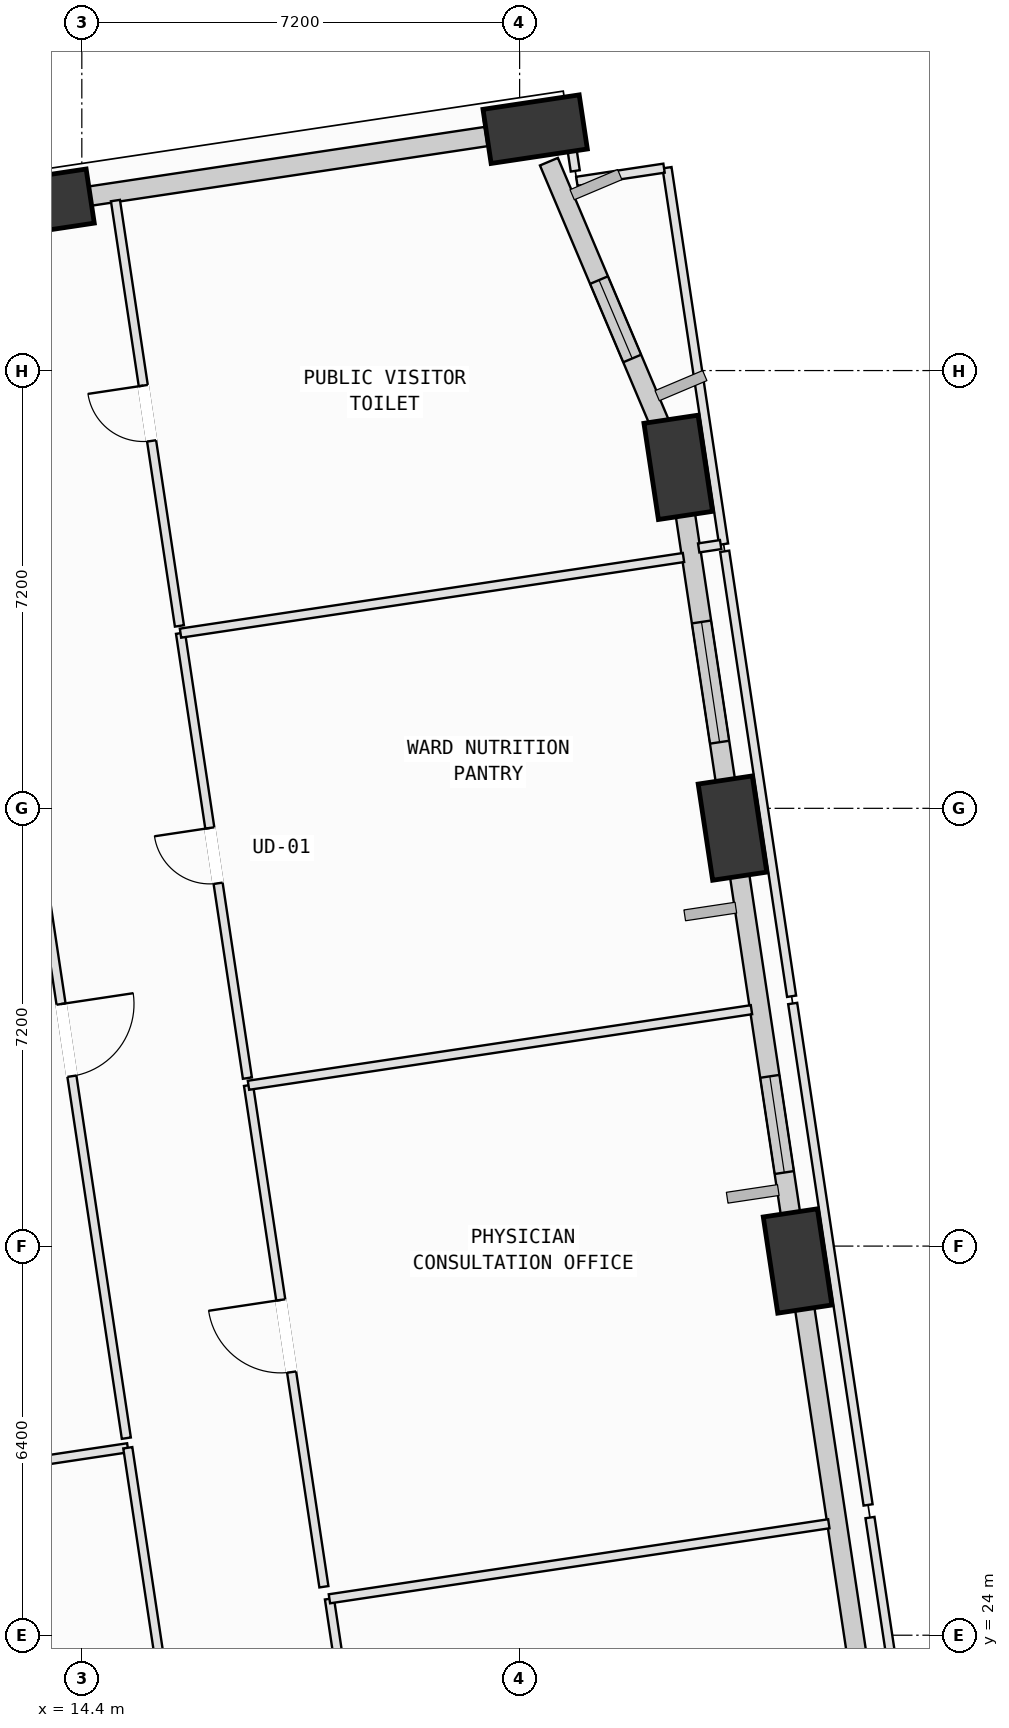
"""IFC4 building model, lengths in metres.
Left out: names, types, materials, properties, quantities, classifications, styles, units other than length and angle.
Written with IfcOpenShell. Run it as: python <this file> out.ifc"""

import sys

from ifc_helpers import new_model, si_unit, direction, frame, frame_2d, origin, origin_2d, place, context, subcontext, project, spatial, rectangle, extrude, element, fill, save


model = new_model("IFC4")
c1 = context("Model", 3, precision=1e-05, world=origin(), true_north=direction((0.0, 1.0)))
c2 = subcontext(c1, "Body", "Model", "MODEL_VIEW")
j1 = project(units=[si_unit("LENGTHUNIT", "METRE"), si_unit("PLANEANGLEUNIT", "RADIAN")], contexts=[c1])
p1 = place(None, origin())
s1 = spatial("IfcSite", under=j1, at=p1, CompositionType="ELEMENT")
p2 = place(p1, origin())
s2 = spatial("IfcBuilding", under=s1, at=p2, CompositionType="ELEMENT")
p3 = place(p2, frame((0.0, 0.0, 59.0)))
s3 = spatial("IfcBuildingStorey", under=s2, at=p3, CompositionType="ELEMENT", Elevation=59.0)
p4 = place(p3, frame((26.171, 30.155, 0.002), z_axis=(-0.021914585822, -0.030949011175, 0.999280696119), x_axis=(0.449715530526, 0.892384243507, 0.037500713923)))
e1 = element("IfcColumn", 1, at=p4, inside=s3, PredefinedType="COLUMN", context=c2, shape_type="SweptSolid", body=[
    extrude(rectangle(XDim=1.6, YDim=0.9, at=origin_2d()), origin(), (0.0, 0.0, 1.0), 4.0),
])
p5 = place(p3, frame((25.101, 37.275, 0.002), z_axis=(-0.051335188808, -0.035544435956, 0.998048742027), x_axis=(0.726800201877, 0.684067930172, 0.061745716144)))
e2 = element("IfcColumn", 2, at=p5, inside=s3, PredefinedType="COLUMN", context=c2, shape_type="SweptSolid", body=[
    extrude(rectangle(XDim=1.6, YDim=0.9, at=origin_2d()), origin(), (0.0, 0.0, 1.0), 4.004),
])
p6 = place(p3, frame((24.209, 43.208, 0.002), z_axis=(-0.075715415354, -0.039379319722, 0.996351566996), x_axis=(0.805520773142, 0.586526828965, 0.084395277955)))
e3 = element("IfcColumn", 3, at=p6, inside=s3, PredefinedType="COLUMN", context=c2, shape_type="SweptSolid", body=[
    extrude(rectangle(XDim=1.6, YDim=0.9, at=origin_2d()), origin(), (0.0, 0.0, 1.0), 4.011),
])
p7 = place(p3, frame((21.855, 48.77, 0.002), z_axis=(-0.098301160351, -0.04918093878, 0.993940701015), x_axis=(0.574616565442, -0.818259586508, 0.016341719877)))
e4 = element("IfcColumn", 4, at=p7, inside=s3, PredefinedType="COLUMN", context=c2, shape_type="SweptSolid", body=[
    extrude(rectangle(XDim=1.6, YDim=0.9, at=origin_2d()), origin(), (0.0, 0.0, 1.0), 4.021),
])
p8 = place(p3, frame((13.747, 47.551, 0.002), z_axis=(-0.092921619704, -0.082435357337, 0.992254999711), x_axis=(0.766615105201, -0.64184127574, 0.018467734958)))
e5 = element("IfcColumn", 5, at=p8, inside=s3, PredefinedType="COLUMN", context=c2, shape_type="SweptSolid", body=[
    extrude(rectangle(XDim=1.6, YDim=0.9, at=origin_2d()), origin(), (0.0, 0.0, 1.0), 4.028),
])
p9 = place(p3, frame((27.241, 23.039, 0.0), z_axis=(0.0, 0.0, 1.0), x_axis=(-0.148660081435, 0.988888355775, 0.0)))
e6 = element("IfcWall", 6, at=p9, inside=s3, PredefinedType="SOLIDWALL", context=c2, shape_type="SweptSolid", body=[
    extrude(rectangle(XDim=6.536, YDim=0.32, at=frame_2d((3.268, 0.0))), origin(), (0.0, 0.0, 1.0), 3.165),
])
p10 = place(p3, frame((26.089, 30.7, 0.0), z_axis=(0.0, 0.0, 1.0), x_axis=(-0.148645050691, 0.988890615238, 0.0)))
e7 = element("IfcWall", 7, at=p10, inside=s3, PredefinedType="SOLIDWALL", context=c2, shape_type="SweptSolid", body=[
    extrude(rectangle(XDim=5.997, YDim=0.32, at=frame_2d((2.998, 0.0))), origin(), (0.0, 0.0, 1.0), 3.165),
])
p11 = place(p10, frame((0.92, 0.0, 0.75)))
e8 = element("IfcOpeningElement", 8, at=p11, cuts=e7, PredefinedType="OPENING", context=c2, shape_type="SweptSolid", body=[
    extrude(rectangle(XDim=1.6, YDim=1.95, at=frame_2d((0.8, 0.975))), frame((0.0, 0.17, 0.0), z_axis=(0.0, -1.0, 0.0), x_axis=(1.0, 0.0, 0.0)), (0.0, 0.0, 1.0), 0.34),
])
p12 = place(p3, frame((25.02, 37.811, 0.0), z_axis=(0.0, 0.0, 1.0), x_axis=(-0.148677559995, 0.988885728056, 0.0)))
e9 = element("IfcWall", 9, at=p12, inside=s3, PredefinedType="SOLIDWALL", context=c2, shape_type="SweptSolid", body=[
    extrude(rectangle(XDim=4.816, YDim=0.32, at=frame_2d((2.408, 0.0))), origin(), (0.0, 0.0, 1.0), 3.165),
])
p13 = place(p12, frame((0.886, 0.0, 0.75)))
e10 = element("IfcOpeningElement", 10, at=p13, cuts=e9, PredefinedType="OPENING", context=c2, shape_type="SweptSolid", body=[
    extrude(rectangle(XDim=2.0, YDim=1.95, at=frame_2d((1.0, 0.975))), frame((0.0, 0.17, 0.0), z_axis=(0.0, -1.0, 0.0), x_axis=(1.0, 0.0, 0.0)), (0.0, 0.0, 1.0), 0.34),
])
p14 = place(p3, frame((22.082, 48.236, 0.0), z_axis=(0.0, 0.0, 1.0), x_axis=(0.389648135914, -0.920963805032, 0.0)))
e11 = element("IfcWall", 11, at=p14, inside=s3, PredefinedType="SOLIDWALL", context=c2, shape_type="SweptSolid", body=[
    extrude(rectangle(XDim=4.889, YDim=0.32, at=frame_2d((2.445, 0.0))), origin(), (0.0, 0.0, 1.0), 3.165),
])
p15 = place(p14, frame((2.115, 0.0, 0.75)))
e12 = element("IfcOpeningElement", 12, at=p15, cuts=e11, PredefinedType="OPENING", context=c2, shape_type="SweptSolid", body=[
    extrude(rectangle(XDim=1.4, YDim=1.85, at=frame_2d((0.7, 0.925))), frame((0.0, 0.17, 0.0), z_axis=(0.0, -1.0, 0.0), x_axis=(1.0, 0.0, 0.0)), (0.0, 0.0, 1.0), 0.34),
])
p16 = place(p3, frame((14.125, 47.608, 0.0), z_axis=(0.0, 0.0, 1.0), x_axis=(0.988884639761, 0.1486847983, 0.0)))
e13 = element("IfcWall", 13, at=p16, inside=s3, PredefinedType="SOLIDWALL", context=c2, shape_type="SweptSolid", body=[
    extrude(rectangle(XDim=7.003, YDim=0.32, at=frame_2d((3.501, 0.0))), origin(), (0.0, 0.0, 1.0), 3.165),
])
p17 = place(p3, frame((5.845, 25.683, 0.0), z_axis=(0.0, 0.0, 1.0), x_axis=(0.988885704997, 0.148677713369, 0.0)))
e14 = element("IfcWall", 14, at=p17, inside=s3, PredefinedType="PARTITIONING", context=c2, shape_type="SweptSolid", body=[
    extrude(rectangle(XDim=9.416, YDim=0.15, at=frame_2d((4.708, 0.0))), origin(), (0.0, 0.0, 1.0), 3.78),
])
p18 = place(p3, frame((15.156, 27.083, 0.0), z_axis=(0.0, 0.0, 1.0), x_axis=(0.148580091248, -0.988900377432, 0.0)))
e15 = element("IfcWall", 15, at=p18, inside=s3, PredefinedType="PARTITIONING", context=c2, shape_type="SweptSolid", body=[
    extrude(rectangle(XDim=6.576, YDim=0.15, at=frame_2d((3.288, 0.0))), origin(), (0.0, 0.0, 1.0), 3.78),
])
p19 = place(p3, frame((13.163, 40.334, 0.0), z_axis=(0.0, 0.0, 1.0), x_axis=(0.148712834823, -0.988880423893, 0.0)))
e16 = element("IfcWall", 16, at=p19, inside=s3, PredefinedType="PARTITIONING", context=c2, shape_type="SweptSolid", body=[
    extrude(rectangle(XDim=13.24, YDim=0.15, at=frame_2d((6.62, 0.0))), origin(), (0.0, 0.0, 1.0), 2.865),
])
p20 = place(p19, frame((6.02, 0.0, 0.0)))
e17 = element("IfcOpeningElement", 17, at=p20, cuts=e16, PredefinedType="OPENING", context=c2, shape_type="SweptSolid", body=[
    extrude(rectangle(XDim=1.2, YDim=2.15, at=frame_2d((0.6, 1.075))), frame((0.0, 0.085, 0.0), z_axis=(0.0, -1.0, 0.0), x_axis=(1.0, 0.0, 0.0)), (0.0, 0.0, 1.0), 0.17),
])
p21 = place(p3, frame((19.076, 20.58, 0.0), z_axis=(0.0, 0.0, 1.0), x_axis=(-0.148616569828, 0.988894895918, 0.0)))
e18 = element("IfcWall", 18, at=p21, inside=s3, PredefinedType="PARTITIONING", context=c2, shape_type="SweptSolid", body=[
    extrude(rectangle(XDim=4.064, YDim=0.15, at=frame_2d((2.032, 0.0))), origin(), (0.0, 0.0, 1.0), 3.78),
])
p22 = place(p3, frame((18.472, 24.599, 0.0), z_axis=(0.0, 0.0, 1.0), x_axis=(0.988902475287, 0.148566127942, 0.0)))
e19 = element("IfcWall", 19, at=p22, inside=s3, PredefinedType="PARTITIONING", context=c2, shape_type="SweptSolid", body=[
    extrude(rectangle(XDim=8.305, YDim=0.15, at=frame_2d((4.153, 0.0))), origin(), (0.0, 0.0, 1.0), 3.78),
])
p23 = place(p3, frame((27.362, 25.935, 0.0), z_axis=(0.0, 0.0, 1.0), x_axis=(0.148721659191, -0.9888790968, 0.0)))
e20 = element("IfcWall", 20, at=p23, inside=s3, PredefinedType="PARTITIONING", context=c2, shape_type="SweptSolid", body=[
    extrude(rectangle(XDim=2.85, YDim=0.15, at=frame_2d((1.425, 0.0))), origin(), (0.0, 0.0, 1.0), 3.78),
])
p24 = place(p3, frame((27.786, 23.117, 0.0), z_axis=(0.0, 0.0, 1.0), x_axis=(0.988887440996, 0.148666166425, 0.0)))
e21 = element("IfcWall", 21, at=p24, inside=s3, PredefinedType="PARTITIONING", context=c2, shape_type="SweptSolid", body=[
    extrude(rectangle(XDim=14.368, YDim=0.15, at=frame_2d((7.184, 0.0))), origin(), (0.0, 0.0, 1.0), 3.165),
])
p25 = place(p3, frame((18.381, 24.797, 0.0), z_axis=(0.0, 0.0, 1.0), x_axis=(-0.148671093469, 0.988886700268, 0.0)))
e22 = element("IfcWall", 22, at=p25, inside=s3, PredefinedType="PARTITIONING", context=c2, shape_type="SweptSolid", body=[
    extrude(rectangle(XDim=8.341, YDim=0.15, at=frame_2d((4.17, 0.0))), origin(), (0.0, 0.0, 1.0), 3.78),
])
p26 = place(p25, frame((3.57, 0.0, 0.0)))
e23 = element("IfcOpeningElement", 23, at=p26, cuts=e22, PredefinedType="OPENING", context=c2, shape_type="SweptSolid", body=[
    extrude(rectangle(XDim=1.2, YDim=2.15, at=frame_2d((0.6, 1.075))), frame((0.0, 0.085, 0.0), z_axis=(0.0, -1.0, 0.0), x_axis=(1.0, 0.0, 0.0)), (0.0, 0.0, 1.0), 0.17),
])
p27 = place(p3, frame((17.141, 33.045, 0.0), z_axis=(0.0, 0.0, 1.0), x_axis=(0.988894782311, 0.148617325764, 0.0)))
e24 = element("IfcWall", 24, at=p27, inside=s3, PredefinedType="PARTITIONING", context=c2, shape_type="SweptSolid", body=[
    extrude(rectangle(XDim=8.365, YDim=0.15, at=frame_2d((4.182, 0.0))), origin(), (0.0, 0.0, 1.0), 3.78),
])
p28 = place(p3, frame((26.091, 34.39, 0.0), z_axis=(0.0, 0.0, 1.0), x_axis=(0.148688309423, -0.988884111836, 0.0)))
e25 = element("IfcWall", 25, at=p28, inside=s3, PredefinedType="PARTITIONING", context=c2, shape_type="SweptSolid", body=[
    extrude(rectangle(XDim=8.34, YDim=0.15, at=frame_2d((4.17, 0.0))), origin(), (0.0, 0.0, 1.0), 3.78),
])
p29 = place(p3, frame((17.123, 33.163, 0.0), z_axis=(0.0, 0.0, 1.0), x_axis=(-0.148659874273, 0.988888386918, 0.0)))
e26 = element("IfcWall", 26, at=p29, inside=s3, PredefinedType="PARTITIONING", context=c2, shape_type="SweptSolid", body=[
    extrude(rectangle(XDim=7.4, YDim=0.15, at=frame_2d((3.7, 0.0))), origin(), (0.0, 0.0, 1.0), 3.78),
])
p30 = place(p29, frame((3.24, 0.0, 0.0)))
e27 = element("IfcOpeningElement", 27, at=p30, cuts=e26, PredefinedType="OPENING", context=c2, shape_type="SweptSolid", body=[
    extrude(rectangle(XDim=0.92, YDim=2.1, at=frame_2d((0.46, 1.05))), frame((0.0, 0.085, 0.0), z_axis=(0.0, -1.0, 0.0), x_axis=(1.0, 0.0, 0.0)), (0.0, 0.0, 1.0), 0.17),
])
p31 = place(p3, frame((16.023, 40.481, 0.0), z_axis=(0.0, 0.0, 1.0), x_axis=(0.98887761826, 0.148731489955, 0.0)))
e28 = element("IfcWall", 28, at=p31, inside=s3, PredefinedType="PARTITIONING", context=c2, shape_type="SweptSolid", body=[
    extrude(rectangle(XDim=8.365, YDim=0.15, at=frame_2d((4.183, 0.0))), origin(), (0.0, 0.0, 1.0), 3.78),
])
p32 = place(p3, frame((24.973, 41.827, 0.0), z_axis=(0.0, 0.0, 1.0), x_axis=(0.148659874273, -0.988888386918, 0.0)))
e29 = element("IfcWall", 29, at=p32, inside=s3, PredefinedType="PARTITIONING", context=c2, shape_type="SweptSolid", body=[
    extrude(rectangle(XDim=7.4, YDim=0.15, at=frame_2d((3.7, 0.0))), origin(), (0.0, 0.0, 1.0), 3.78),
])
p33 = place(p3, frame((24.024, 48.136, 0.0), z_axis=(0.0, 0.0, 1.0), x_axis=(0.148733268236, -0.988877350797, 0.0)))
e30 = element("IfcWall", 30, at=p33, inside=s3, PredefinedType="PARTITIONING", context=c2, shape_type="SweptSolid", body=[
    extrude(rectangle(XDim=6.26, YDim=0.15, at=frame_2d((3.13, 0.0))), origin(), (0.0, 0.0, 1.0), 3.78),
])
p34 = place(p3, frame((24.906, 41.938, 0.0), z_axis=(0.0, 0.0, 1.0), x_axis=(-0.988625320152, -0.150399389475, 0.0)))
e31 = element("IfcWall", 31, at=p34, inside=s3, PredefinedType="PARTITIONING", context=c2, shape_type="SweptSolid", body=[
    extrude(rectangle(XDim=0.365, YDim=0.15, at=frame_2d((0.183, 0.0))), origin(), (0.0, 0.0, 1.0), 3.78),
])
p35 = place(p3, frame((16.005, 40.6, 0.0), z_axis=(0.0, 0.0, 1.0), x_axis=(-0.148703261216, 0.988881863573, 0.0)))
e32 = element("IfcWall", 32, at=p35, inside=s3, PredefinedType="PARTITIONING", context=c2, shape_type="SweptSolid", body=[
    extrude(rectangle(XDim=7.074, YDim=0.15, at=frame_2d((3.537, 0.0))), origin(), (0.0, 0.0, 1.0), 3.78),
])
p36 = place(p35, frame((3.077, 0.0, 0.0)))
e33 = element("IfcOpeningElement", 33, at=p36, cuts=e32, PredefinedType="OPENING", context=c2, shape_type="SweptSolid", body=[
    extrude(rectangle(XDim=0.92, YDim=2.1, at=frame_2d((0.46, 1.05))), frame((0.0, 0.085, 0.0), z_axis=(0.0, -1.0, 0.0), x_axis=(1.0, 0.0, 0.0)), (0.0, 0.0, 1.0), 0.17),
])
p37 = place(p3, frame((21.022, 48.837, 0.0), z_axis=(0.0, 0.0, 1.0), x_axis=(0.988854825253, 0.148882955956, 0.0)))
e34 = element("IfcWall", 34, at=p37, inside=s3, PredefinedType="PARTITIONING", context=c2, shape_type="SweptSolid", body=[
    extrude(rectangle(XDim=1.364, YDim=0.15, at=frame_2d((0.682, 0.0))), origin(), (0.0, 0.0, 1.0), 3.165),
])
p38 = place(p3, frame((22.378, 48.991, 0.0), z_axis=(0.0, 0.0, 1.0), x_axis=(0.149316522571, -0.988789449826, 0.0)))
e35 = element("IfcWall", 35, at=p38, inside=s3, PredefinedType="PARTITIONING", context=c2, shape_type="SweptSolid", body=[
    extrude(rectangle(XDim=0.917, YDim=0.15, at=frame_2d((0.458, 0.0))), origin(), (0.0, 0.0, 1.0), 3.78),
])
p39 = place(p3, frame((22.541, 47.913, 0.0), z_axis=(0.0, 0.0, 1.0), x_axis=(0.988864618513, 0.148817896283, 0.0)))
e36 = element("IfcWall", 36, at=p39, inside=s3, PredefinedType="PARTITIONING", context=c2, shape_type="SweptSolid", body=[
    extrude(rectangle(XDim=1.45, YDim=0.15, at=frame_2d((0.725, 0.0))), origin(), (0.0, 0.0, 1.0), 3.78),
])
p40 = place(p11, origin())
e37 = element("IfcWindow", 37, at=p40, inside=s3, PartitioningType="SINGLE_PANEL", PredefinedType="WINDOW", context=c2, shape_type="SweptSolid", body=[
    extrude(rectangle(XDim=1.6, YDim=1.95, at=frame_2d((0.8, 0.975))), frame((0.0, 0.03, 0.0), z_axis=(0.0, -1.0, 0.0), x_axis=(1.0, 0.0, 0.0)), (0.0, 0.0, 1.0), 0.06),
])
fill(e8, e37)
p41 = place(p13, origin())
e38 = element("IfcWindow", 38, at=p41, inside=s3, PartitioningType="SINGLE_PANEL", PredefinedType="WINDOW", context=c2, shape_type="SweptSolid", body=[
    extrude(rectangle(XDim=2.0, YDim=1.95, at=frame_2d((1.0, 0.975))), frame((0.0, 0.03, 0.0), z_axis=(0.0, -1.0, 0.0), x_axis=(1.0, 0.0, 0.0)), (0.0, 0.0, 1.0), 0.06),
])
fill(e10, e38)
p42 = place(p15, origin())
e39 = element("IfcWindow", 39, at=p42, inside=s3, PartitioningType="SINGLE_PANEL", PredefinedType="WINDOW", context=c2, shape_type="SweptSolid", body=[
    extrude(rectangle(XDim=1.4, YDim=1.85, at=frame_2d((0.7, 0.925))), frame((0.0, 0.03, 0.0), z_axis=(0.0, -1.0, 0.0), x_axis=(1.0, 0.0, 0.0)), (0.0, 0.0, 1.0), 0.06),
])
fill(e12, e39)
p43 = place(p20, origin())
e40 = element("IfcDoor", 40, at=p43, inside=s3, OperationType="SINGLE_SWING_LEFT", PredefinedType="DOOR", context=c2, shape_type="SweptSolid", body=[
    extrude(rectangle(XDim=1.2, YDim=2.15, at=frame_2d((0.6, 1.075))), frame((0.0, 0.025, 0.0), z_axis=(0.0, -1.0, 0.0), x_axis=(1.0, 0.0, 0.0)), (0.0, 0.0, 1.0), 0.05),
])
fill(e17, e40)
p44 = place(p26, origin())
e41 = element("IfcDoor", 41, at=p44, inside=s3, OperationType="SINGLE_SWING_RIGHT", PredefinedType="DOOR", context=c2, shape_type="SweptSolid", body=[
    extrude(rectangle(XDim=1.2, YDim=2.15, at=frame_2d((0.6, 1.075))), frame((0.0, 0.025, 0.0), z_axis=(0.0, -1.0, 0.0), x_axis=(1.0, 0.0, 0.0)), (0.0, 0.0, 1.0), 0.05),
])
fill(e23, e41)
p45 = place(p30, origin())
e42 = element("IfcDoor", 42, at=p45, inside=s3, OperationType="SINGLE_SWING_RIGHT", PredefinedType="DOOR", context=c2, shape_type="SweptSolid", body=[
    extrude(rectangle(XDim=0.92, YDim=2.1, at=frame_2d((0.46, 1.05))), frame((0.0, 0.025, 0.0), z_axis=(0.0, -1.0, 0.0), x_axis=(1.0, 0.0, 0.0)), (0.0, 0.0, 1.0), 0.05),
])
fill(e27, e42)
p46 = place(p36, origin())
e43 = element("IfcDoor", 43, at=p46, inside=s3, OperationType="SINGLE_SWING_RIGHT", PredefinedType="DOOR", context=c2, shape_type="SweptSolid", body=[
    extrude(rectangle(XDim=0.92, YDim=2.1, at=frame_2d((0.46, 1.05))), frame((0.0, 0.025, 0.0), z_axis=(0.0, -1.0, 0.0), x_axis=(1.0, 0.0, 0.0)), (0.0, 0.0, 1.0), 0.05),
])
fill(e33, e43)
save(model, sys.argv[1])
